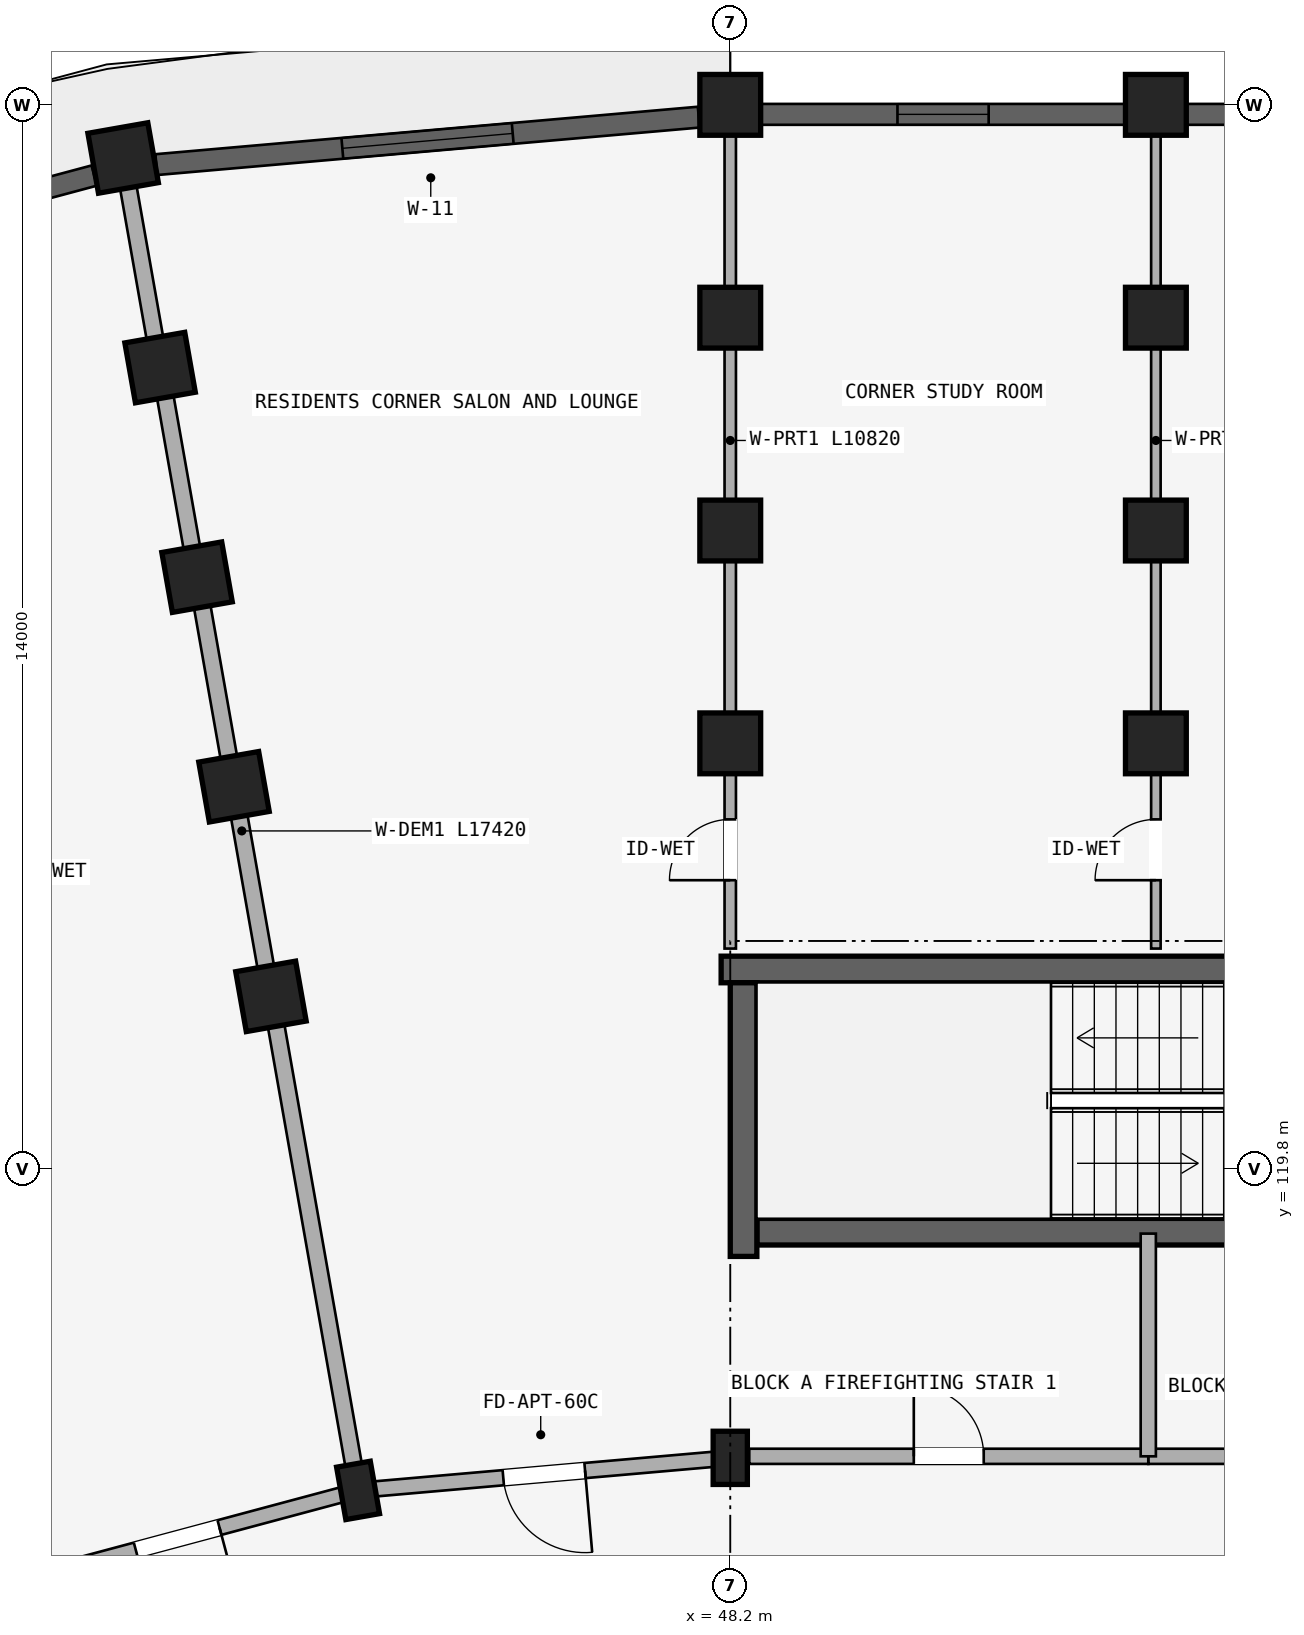
"""IFC4 building model, lengths in metres.
Left out: names, types, materials, properties, quantities, classifications, styles, units other than length and angle.
Written with IfcOpenShell. Run it as: python <this file> out.ifc"""

import sys

from ifc_helpers import new_model, si_unit, direction, frame, frame_2d, origin, origin_2d, place, context, subcontext, project, spatial, rectangle, extrude, element, fill, save


model = new_model("IFC4")
c1 = context("Model", 3, precision=1e-05, world=origin(), true_north=direction((0.0, 1.0)))
c2 = subcontext(c1, "Body", "Model", "MODEL_VIEW")
j1 = project(units=[si_unit("LENGTHUNIT", "METRE"), si_unit("PLANEANGLEUNIT", "RADIAN")], contexts=[c1])
p1 = place(None, origin())
s1 = spatial("IfcSite", under=j1, at=p1, CompositionType="ELEMENT")
p2 = place(p1, origin())
s2 = spatial("IfcBuilding", under=s1, at=p2, CompositionType="ELEMENT")
p3 = place(p2, frame((0.0, 0.0, 15.0)))
s3 = spatial("IfcBuildingStorey", under=s2, at=p3, CompositionType="ELEMENT", Elevation=15.0)
p4 = place(p3, frame((48.08, 122.425, 0.0), z_axis=(0.0, 0.0, 1.0), x_axis=(1.0, 0.0, 0.0)))
e1 = element("IfcWall", 1, at=p4, inside=s3, PredefinedType="SHEAR", context=c2, shape_type="SweptSolid", body=[
    extrude(rectangle(XDim=8.545, YDim=0.35, at=frame_2d((4.272, 0.0))), origin(), (0.0, 0.0, 1.0), 2.93),
])
p5 = place(p3, frame((48.55, 118.975, 0.0), z_axis=(0.0, 0.0, 1.0), x_axis=(1.0, 0.0, 0.0)))
e2 = element("IfcWall", 2, at=p5, inside=s3, PredefinedType="SHEAR", context=c2, shape_type="SweptSolid", body=[
    extrude(rectangle(XDim=8.075, YDim=0.35, at=frame_2d((4.038, 0.0))), origin(), (0.0, 0.0, 1.0), 2.93),
])
p6 = place(p5, frame((6.38, 0.0, 0.0)))
e3 = element("IfcOpeningElement", 3, at=p6, cuts=e2, PredefinedType="OPENING", context=c2, shape_type="SweptSolid", body=[
    extrude(rectangle(XDim=1.24, YDim=2.15, at=frame_2d((0.62, 1.075))), frame((0.0, 0.185, 0.0), z_axis=(0.0, -1.0, 0.0), x_axis=(1.0, 0.0, 0.0)), (0.0, 0.0, 1.0), 0.37),
])
p7 = place(p3, frame((48.375, 118.65, 0.0), z_axis=(0.0, 0.0, 1.0), x_axis=(0.0, 1.0, 0.0)))
e4 = element("IfcWall", 4, at=p7, inside=s3, PredefinedType="SHEAR", context=c2, shape_type="SweptSolid", body=[
    extrude(rectangle(XDim=3.6, YDim=0.35, at=frame_2d((1.8, 0.0))), origin(), (0.0, 0.0, 1.0), 2.93),
])
p8 = place(p3, frame((48.2, 116.0, 0.0), z_axis=(0.0, 0.0, 1.0), x_axis=(1.0, 0.0, 0.0)))
e5 = element("IfcColumn", 5, at=p8, inside=s3, PredefinedType="COLUMN", context=c2, shape_type="SweptSolid", body=[
    extrude(rectangle(XDim=0.45, YDim=0.7, at=origin_2d()), origin(), (0.0, 0.0, 1.0), 2.93),
])
for number, where, z_axis, x_axis in (
    (6, (48.2, 125.4, 0.0), (0.0, 0.0, 1.0), (1.0, 0.0, 0.0)),
    (7, (48.2, 128.2, 0.0), (0.0, 0.0, 1.0), (1.0, 0.0, 0.0)),
    (8, (48.2, 131.0, 0.0), (0.0, 0.0, 1.0), (1.0, 0.0, 0.0)),
    (9, (48.2, 133.8, 0.0), (0.0, 0.0, 1.0), (1.0, 0.0, 0.0)),
):
    element("IfcColumn", number, at=place(p3, frame(where, z_axis=z_axis, x_axis=x_axis)), inside=s3, PredefinedType="COLUMN", context=c2, shape_type="SweptSolid", body=[
        extrude(rectangle(XDim=0.8, YDim=0.8, at=origin_2d()), origin(), (0.0, 0.0, 1.0), 2.93),
    ])
p9 = place(p3, frame((43.303, 115.572, 0.0), z_axis=(0.0, 0.0, 1.0), x_axis=(0.984807753012, 0.173648177667, 0.0)))
e10 = element("IfcColumn", 10, at=p9, inside=s3, PredefinedType="COLUMN", context=c2, shape_type="SweptSolid", body=[
    extrude(rectangle(XDim=0.45, YDim=0.7, at=origin_2d()), origin(), (0.0, 0.0, 1.0), 2.93),
])
for number, where, z_axis, x_axis in (
    (11, (42.157, 122.071, 0.0), (0.0, 0.0, 1.0), (0.985, 0.174, 0.0)),
    (12, (41.671, 124.829, 0.0), (0.0, 0.0, 1.0), (0.985, 0.174, 0.0)),
    (13, (41.185, 127.586, 0.0), (0.0, 0.0, 1.0), (0.985, 0.174, 0.0)),
    (14, (40.698, 130.344, 0.0), (0.0, 0.0, 1.0), (0.985, 0.174, 0.0)),
    (15, (40.212, 133.101, 0.0), (0.0, 0.0, 1.0), (0.985, 0.174, 0.0)),
    (16, (53.8, 125.4, 0.0), (0.0, 0.0, 1.0), (1.0, 0.0, 0.0)),
    (17, (53.8, 128.2, 0.0), (0.0, 0.0, 1.0), (1.0, 0.0, 0.0)),
    (18, (53.8, 131.0, 0.0), (0.0, 0.0, 1.0), (1.0, 0.0, 0.0)),
    (19, (53.8, 133.8, 0.0), (0.0, 0.0, 1.0), (1.0, 0.0, 0.0)),
):
    element("IfcColumn", number, at=place(p3, frame(where, z_axis=z_axis, x_axis=x_axis)), inside=s3, PredefinedType="COLUMN", context=c2, shape_type="SweptSolid", body=[
        extrude(rectangle(XDim=0.8, YDim=0.8, at=origin_2d()), origin(), (0.0, 0.0, 1.0), 2.93),
    ])
p10 = place(p3, frame((53.7, 116.02, 0.0), z_axis=(0.0, 0.0, 1.0), x_axis=(1.0, 0.0, 0.0)))
e20 = element("IfcWall", 20, at=p10, inside=s3, PredefinedType="STANDARD", context=c2, shape_type="SweptSolid", body=[
    extrude(rectangle(XDim=5.65, YDim=0.2, at=frame_2d((2.825, 0.0))), origin(), (0.0, 0.0, 1.0), 2.372),
])
p11 = place(p10, frame((1.923, 0.0, 0.0)))
e21 = element("IfcOpeningElement", 21, at=p11, cuts=e20, PredefinedType="OPENING", context=c2, shape_type="SweptSolid", body=[
    extrude(rectangle(XDim=1.24, YDim=2.15, at=frame_2d((0.62, 1.075))), frame((0.0, 0.11, 0.0), z_axis=(0.0, -1.0, 0.0), x_axis=(1.0, 0.0, 0.0)), (0.0, 0.0, 1.0), 0.22),
])
p12 = place(p3, frame((48.45, 116.02, 0.0), z_axis=(0.0, 0.0, 1.0), x_axis=(1.0, 0.0, 0.0)))
e22 = element("IfcWall", 22, at=p12, inside=s3, PredefinedType="STANDARD", context=c2, shape_type="SweptSolid", body=[
    extrude(rectangle(XDim=5.25, YDim=0.2, at=frame_2d((2.625, 0.0))), origin(), (0.0, 0.0, 1.0), 2.372),
])
p13 = place(p12, frame((2.165, 0.0, 0.0)))
e23 = element("IfcOpeningElement", 23, at=p13, cuts=e22, PredefinedType="OPENING", context=c2, shape_type="SweptSolid", body=[
    extrude(rectangle(XDim=0.92, YDim=2.1, at=frame_2d((0.46, 1.05))), frame((0.0, 0.11, 0.0), z_axis=(0.0, -1.0, 0.0), x_axis=(1.0, 0.0, 0.0)), (0.0, 0.0, 1.0), 0.22),
])
p14 = place(p3, frame((53.7, 116.02, 0.0), z_axis=(0.0, 0.0, 1.0), x_axis=(0.0, 1.0, 0.0)))
e24 = element("IfcWall", 24, at=p14, inside=s3, PredefinedType="STANDARD", context=c2, shape_type="SweptSolid", body=[
    extrude(rectangle(XDim=2.93, YDim=0.2, at=frame_2d((1.465, 0.0))), origin(), (0.0, 0.0, 1.0), 2.372),
])
p15 = place(p3, frame((53.8, 122.7, 0.0), z_axis=(0.0, 0.0, 1.0), x_axis=(0.0, 1.0, 0.0)))
e25 = element("IfcWall", 25, at=p15, inside=s3, PredefinedType="PARTITIONING", context=c2, shape_type="SweptSolid", body=[
    extrude(rectangle(XDim=10.82, YDim=0.125, at=frame_2d((5.41, 0.0))), origin(), (0.0, 0.0, 1.0), 2.372),
])
p16 = place(p15, frame((0.899, 0.0, 0.0)))
e26 = element("IfcOpeningElement", 26, at=p16, cuts=e25, PredefinedType="OPENING", context=c2, shape_type="SweptSolid", body=[
    extrude(rectangle(XDim=0.8, YDim=2.1, at=frame_2d((0.4, 1.05))), frame((0.0, 0.073, 0.0), z_axis=(0.0, -1.0, 0.0), x_axis=(1.0, 0.0, 0.0)), (0.0, 0.0, 1.0), 0.145),
])
p17 = place(p3, frame((48.2, 116.0, 0.0), z_axis=(0.0, 0.0, 1.0), x_axis=(-0.996193663584, -0.087167566415, 0.0)))
e27 = element("IfcWall", 27, at=p17, inside=s3, PredefinedType="STANDARD", context=c2, shape_type="SweptSolid", body=[
    extrude(rectangle(XDim=4.916, YDim=0.2, at=frame_2d((2.458, 0.0))), origin(), (0.0, 0.0, 1.0), 2.372),
])
p18 = place(p17, frame((1.918, 0.0, 0.0)))
e28 = element("IfcOpeningElement", 28, at=p18, cuts=e27, PredefinedType="OPENING", context=c2, shape_type="SweptSolid", body=[
    extrude(rectangle(XDim=1.08, YDim=2.15, at=frame_2d((0.54, 1.075))), frame((0.0, 0.11, 0.0), z_axis=(0.0, -1.0, 0.0), x_axis=(1.0, 0.0, 0.0)), (0.0, 0.0, 1.0), 0.22),
])
p19 = place(p3, frame((43.303, 115.572, 0.0), z_axis=(0.0, 0.0, 1.0), x_axis=(-0.965930095386, -0.258803112091, 0.0)))
e29 = element("IfcWall", 29, at=p19, inside=s3, PredefinedType="STANDARD", context=c2, shape_type="SweptSolid", body=[
    extrude(rectangle(XDim=4.916, YDim=0.2, at=frame_2d((2.458, 0.0))), origin(), (0.0, 0.0, 1.0), 2.372),
])
p20 = place(p19, frame((1.888, 0.0, 0.0)))
e30 = element("IfcOpeningElement", 30, at=p20, cuts=e29, PredefinedType="OPENING", context=c2, shape_type="SweptSolid", body=[
    extrude(rectangle(XDim=1.14, YDim=2.15, at=frame_2d((0.57, 1.075))), frame((0.0, 0.11, 0.0), z_axis=(0.0, -1.0, 0.0), x_axis=(1.0, 0.0, 0.0)), (0.0, 0.0, 1.0), 0.22),
])
p21 = place(p3, frame((48.2, 122.7, 0.0), z_axis=(0.0, 0.0, 1.0), x_axis=(0.0, 1.0, 0.0)))
e31 = element("IfcWall", 31, at=p21, inside=s3, PredefinedType="PARTITIONING", context=c2, shape_type="SweptSolid", body=[
    extrude(rectangle(XDim=10.82, YDim=0.15, at=frame_2d((5.41, 0.0))), origin(), (0.0, 0.0, 1.0), 2.372),
])
p22 = place(p21, frame((0.899, 0.0, 0.0)))
e32 = element("IfcOpeningElement", 32, at=p22, cuts=e31, PredefinedType="OPENING", context=c2, shape_type="SweptSolid", body=[
    extrude(rectangle(XDim=0.8, YDim=2.1, at=frame_2d((0.4, 1.05))), frame((0.0, 0.085, 0.0), z_axis=(0.0, -1.0, 0.0), x_axis=(1.0, 0.0, 0.0)), (0.0, 0.0, 1.0), 0.17),
])
p23 = place(p3, frame((43.286, 115.67, 0.0), z_axis=(0.0, 0.0, 1.0), x_axis=(-0.173646216546, 0.984808098809, 0.0)))
e33 = element("IfcWall", 33, at=p23, inside=s3, PredefinedType="STANDARD", context=c2, shape_type="SweptSolid", body=[
    extrude(rectangle(XDim=17.42, YDim=0.22, at=frame_2d((8.71, 0.0))), origin(), (0.0, 0.0, 1.0), 2.372),
])
p24 = place(p3, frame((47.785, 133.638, 0.0), z_axis=(0.0, 0.0, 1.0), x_axis=(-0.99619608453, -0.08713989423, 0.0)))
e34 = element("IfcWall", 34, at=p24, inside=s3, PredefinedType="STANDARD", context=c2, shape_type="SweptSolid", body=[
    extrude(rectangle(XDim=7.164, YDim=0.275, at=frame_2d((3.582, 0.0))), origin(), (0.0, 0.0, 1.0), 2.472),
])
p25 = place(p24, frame((2.457, 0.0, 0.322)))
e35 = element("IfcOpeningElement", 35, at=p25, cuts=e34, PredefinedType="OPENING", context=c2, shape_type="SweptSolid", body=[
    extrude(rectangle(XDim=2.25, YDim=1.95, at=frame_2d((1.125, 0.975))), frame((0.0, 0.147, 0.0), z_axis=(0.0, -1.0, 0.0), x_axis=(1.0, 0.0, 0.0)), (0.0, 0.0, 1.0), 0.295),
])
p26 = place(p3, frame((39.832, 132.87, 0.0), z_axis=(0.0, 0.0, 1.0), x_axis=(-0.965923712619, -0.258826933296, 0.0)))
e36 = element("IfcWall", 36, at=p26, inside=s3, PredefinedType="STANDARD", context=c2, shape_type="SweptSolid", body=[
    extrude(rectangle(XDim=7.164, YDim=0.275, at=frame_2d((3.582, 0.0))), origin(), (0.0, 0.0, 1.0), 2.472),
])
p27 = place(p26, frame((4.69, 0.0, 0.472)))
e37 = element("IfcOpeningElement", 37, at=p27, cuts=e36, PredefinedType="OPENING", context=c2, shape_type="SweptSolid", body=[
    extrude(rectangle(XDim=1.2, YDim=1.5, at=frame_2d((0.6, 0.75))), frame((0.0, 0.147, 0.0), z_axis=(0.0, -1.0, 0.0), x_axis=(1.0, 0.0, 0.0)), (0.0, 0.0, 1.0), 0.295),
])
p28 = place(p26, frame((1.847, 0.0, 0.0)))
e38 = element("IfcOpeningElement", 38, at=p28, cuts=e36, PredefinedType="OPENING", context=c2, shape_type="SweptSolid", body=[
    extrude(rectangle(XDim=1.32, YDim=2.15, at=frame_2d((0.66, 1.075))), frame((0.0, 0.147, 0.0), z_axis=(0.0, -1.0, 0.0), x_axis=(1.0, 0.0, 0.0)), (0.0, 0.0, 1.0), 0.295),
])
p29 = place(p3, frame((48.604, 133.675, 0.0), z_axis=(0.0, 0.0, 1.0), x_axis=(1.0, 0.0, 0.0)))
e39 = element("IfcWall", 39, at=p29, inside=s3, PredefinedType="STANDARD", context=c2, shape_type="SweptSolid", body=[
    extrude(rectangle(XDim=4.793, YDim=0.275, at=frame_2d((2.396, 0.0))), origin(), (0.0, 0.0, 1.0), 2.472),
])
p30 = place(p29, frame((1.796, 0.0, 0.772)))
e40 = element("IfcOpeningElement", 40, at=p30, cuts=e39, PredefinedType="OPENING", context=c2, shape_type="SweptSolid", body=[
    extrude(rectangle(XDim=1.2, YDim=1.5, at=frame_2d((0.6, 0.75))), frame((0.0, 0.147, 0.0), z_axis=(0.0, -1.0, 0.0), x_axis=(1.0, 0.0, 0.0)), (0.0, 0.0, 1.0), 0.295),
])
p31 = place(p3, frame((54.204, 133.675, 0.0), z_axis=(0.0, 0.0, 1.0), x_axis=(1.0, 0.0, 0.0)))
e41 = element("IfcWall", 41, at=p31, inside=s3, PredefinedType="STANDARD", context=c2, shape_type="SweptSolid", body=[
    extrude(rectangle(XDim=4.793, YDim=0.275, at=frame_2d((2.396, 0.0))), origin(), (0.0, 0.0, 1.0), 2.472),
])
p32 = place(p31, frame((1.846, 0.0, 0.822)))
e42 = element("IfcOpeningElement", 42, at=p32, cuts=e41, PredefinedType="OPENING", context=c2, shape_type="SweptSolid", body=[
    extrude(rectangle(XDim=1.1, YDim=1.45, at=frame_2d((0.55, 0.725))), frame((0.0, 0.147, 0.0), z_axis=(0.0, -1.0, 0.0), x_axis=(1.0, 0.0, 0.0)), (0.0, 0.0, 1.0), 0.295),
])
p33 = place(p25, origin())
e43 = element("IfcWindow", 43, at=p33, inside=s3, PartitioningType="TRIPLE_PANEL_VERTICAL", PredefinedType="WINDOW", context=c2, shape_type="SweptSolid", body=[
    extrude(rectangle(XDim=2.25, YDim=1.95, at=frame_2d((1.125, 0.975))), frame((0.0, 0.03, 0.0), z_axis=(0.0, -1.0, 0.0), x_axis=(1.0, 0.0, 0.0)), (0.0, 0.0, 1.0), 0.06),
])
fill(e35, e43)
p34 = place(p30, origin())
e44 = element("IfcWindow", 44, at=p34, inside=s3, PartitioningType="SINGLE_PANEL", PredefinedType="WINDOW", context=c2, shape_type="SweptSolid", body=[
    extrude(rectangle(XDim=1.2, YDim=1.5, at=frame_2d((0.6, 0.75))), frame((0.0, 0.03, 0.0), z_axis=(0.0, -1.0, 0.0), x_axis=(1.0, 0.0, 0.0)), (0.0, 0.0, 1.0), 0.06),
])
fill(e40, e44)
p35 = place(p13, frame((0.92, 0.0, 0.0), z_axis=(0.0, 0.0, 1.0), x_axis=(-1.0, 0.0, 0.0)))
e45 = element("IfcDoor", 45, at=p35, inside=s3, OperationType="SINGLE_SWING_RIGHT", PredefinedType="DOOR", context=c2, shape_type="SweptSolid", body=[
    extrude(rectangle(XDim=0.92, YDim=2.1, at=frame_2d((0.46, 1.05))), frame((0.0, 0.025, 0.0), z_axis=(0.0, -1.0, 0.0), x_axis=(1.0, 0.0, 0.0)), (0.0, 0.0, 1.0), 0.05),
])
fill(e23, e45)
p36 = place(p16, frame((0.8, 0.0, 0.0), z_axis=(0.0, 0.0, 1.0), x_axis=(-1.0, 0.0, 0.0)))
e46 = element("IfcDoor", 46, at=p36, inside=s3, OperationType="SINGLE_SWING_RIGHT", PredefinedType="DOOR", context=c2, shape_type="SweptSolid", body=[
    extrude(rectangle(XDim=0.8, YDim=2.1, at=frame_2d((0.4, 1.05))), frame((0.0, 0.025, 0.0), z_axis=(0.0, -1.0, 0.0), x_axis=(1.0, 0.0, 0.0)), (0.0, 0.0, 1.0), 0.05),
])
fill(e26, e46)
p37 = place(p22, frame((0.8, 0.0, 0.0), z_axis=(0.0, 0.0, 1.0), x_axis=(-1.0, 0.0, 0.0)))
e47 = element("IfcDoor", 47, at=p37, inside=s3, OperationType="SINGLE_SWING_RIGHT", PredefinedType="DOOR", context=c2, shape_type="SweptSolid", body=[
    extrude(rectangle(XDim=0.8, YDim=2.1, at=frame_2d((0.4, 1.05))), frame((0.0, 0.025, 0.0), z_axis=(0.0, -1.0, 0.0), x_axis=(1.0, 0.0, 0.0)), (0.0, 0.0, 1.0), 0.05),
])
fill(e32, e47)
p38 = place(p18, origin())
e48 = element("IfcDoor", 48, at=p38, inside=s3, OperationType="SINGLE_SWING_LEFT", PredefinedType="DOOR", context=c2, shape_type="SweptSolid", body=[
    extrude(rectangle(XDim=1.08, YDim=2.15, at=frame_2d((0.54, 1.075))), frame((0.0, 0.025, 0.0), z_axis=(0.0, -1.0, 0.0), x_axis=(1.0, 0.0, 0.0)), (0.0, 0.0, 1.0), 0.05),
])
fill(e28, e48)
p39 = place(p20, frame((1.14, 0.0, 0.0), z_axis=(0.0, 0.0, 1.0), x_axis=(-1.0, 0.0, 0.0)))
e49 = element("IfcDoor", 49, at=p39, inside=s3, OperationType="SINGLE_SWING_RIGHT", PredefinedType="DOOR", context=c2, shape_type="SweptSolid", body=[
    extrude(rectangle(XDim=1.14, YDim=2.15, at=frame_2d((0.57, 1.075))), frame((0.0, 0.025, 0.0), z_axis=(0.0, -1.0, 0.0), x_axis=(1.0, 0.0, 0.0)), (0.0, 0.0, 1.0), 0.05),
])
fill(e30, e49)
save(model, sys.argv[1])
